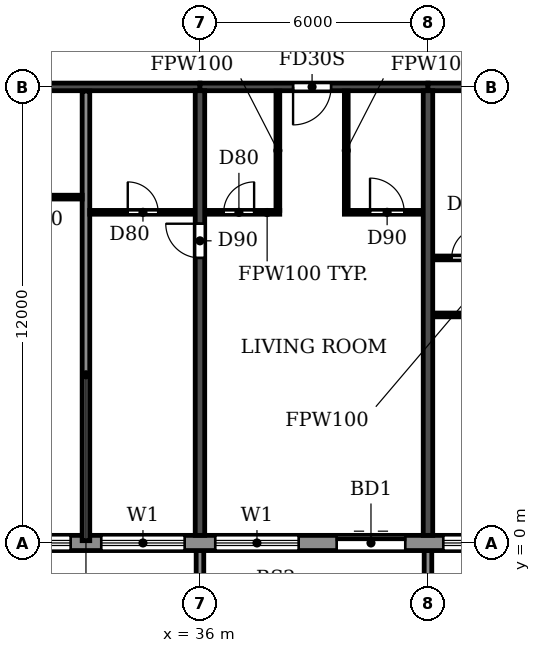
"""IFC4 building model, lengths in metres.
Left out: names, types, materials, properties, quantities, classifications, styles, units other than length and angle.
Written with IfcOpenShell. Run it as: python <this file> out.ifc"""

import sys

from ifc_helpers import new_model, si_unit, direction, frame, frame_2d, origin, place, context, subcontext, project, spatial, polyline, rectangle, outline, extrude, source, transform, mapped, element, fill, save


model = new_model("IFC4")
c1 = context("Model", 3, precision=1e-05, world=origin(), true_north=direction((0.0, 1.0)))
c2 = subcontext(c1, "Body", "Model", "MODEL_VIEW")
j1 = project(units=[si_unit("LENGTHUNIT", "METRE"), si_unit("PLANEANGLEUNIT", "RADIAN")], contexts=[c1])
p1 = place(None, origin())
s1 = spatial("IfcSite", under=j1, at=p1, CompositionType="ELEMENT")
p2 = place(p1, origin())
s2 = spatial("IfcBuilding", under=s1, at=p2, CompositionType="ELEMENT")
p3 = place(p2, frame((0.0, 0.0, 241.2)))
s3 = spatial("IfcBuildingStorey", under=s2, at=p3, CompositionType="ELEMENT", Elevation=241.2)
p4 = place(p3, frame((36.0, 0.2, 0.0), z_axis=(0.0, 0.0, 1.0), x_axis=(0.0, 1.0, 0.0)))
e1 = element("IfcWall", 1, at=p4, inside=s3, PredefinedType="SHEAR", context=c2, shape_type="SweptSolid", body=[
    extrude(rectangle(XDim=11.7, YDim=0.25, at=frame_2d((5.85, 0.0))), origin(), (0.0, 0.0, 1.0), 3.08),
])
p5 = place(p4, frame((7.3, 0.0, 0.0)))
e2 = element("IfcOpeningElement", 2, at=p5, cuts=e1, PredefinedType="OPENING", context=c2, shape_type="SweptSolid", body=[
    extrude(rectangle(XDim=0.9, YDim=2.1, at=frame_2d((0.45, 1.05))), frame((0.0, 0.135, 0.0), z_axis=(0.0, -1.0, 0.0), x_axis=(1.0, 0.0, 0.0)), (0.0, 0.0, 1.0), 0.27),
])
p6 = place(p3, frame((42.0, 0.2, 0.0), z_axis=(0.0, 0.0, 1.0), x_axis=(0.0, 1.0, 0.0)))
e3 = element("IfcWall", 3, at=p6, inside=s3, PredefinedType="SHEAR", context=c2, shape_type="SweptSolid", body=[
    extrude(rectangle(XDim=11.7, YDim=0.25, at=frame_2d((5.85, 0.0))), origin(), (0.0, 0.0, 1.0), 3.08),
])
p7 = place(p3, frame((30.0, 12.0, 0.0), z_axis=(0.0, 0.0, 1.0), x_axis=(1.0, 0.0, 0.0)))
e4 = element("IfcWall", 4, at=p7, inside=s3, PredefinedType="SHEAR", context=c2, shape_type="SweptSolid", body=[
    extrude(rectangle(XDim=6.0, YDim=0.2, at=frame_2d((3.0, 0.0))), origin(), (0.0, 0.0, 1.0), 2.48),
])
p8 = place(p3, frame((36.0, 12.0, 0.0), z_axis=(0.0, 0.0, 1.0), x_axis=(1.0, 0.0, 0.0)))
e5 = element("IfcWall", 5, at=p8, inside=s3, PredefinedType="SHEAR", context=c2, shape_type="SweptSolid", body=[
    extrude(rectangle(XDim=6.0, YDim=0.2, at=frame_2d((3.0, 0.0))), origin(), (0.0, 0.0, 1.0), 2.48),
])
p9 = place(p8, frame((2.45, 0.0, 0.0)))
e6 = element("IfcOpeningElement", 6, at=p9, cuts=e5, PredefinedType="OPENING", context=c2, shape_type="SweptSolid", body=[
    extrude(rectangle(XDim=1.0, YDim=2.1, at=frame_2d((0.5, 1.05))), frame((0.0, 0.11, 0.0), z_axis=(0.0, -1.0, 0.0), x_axis=(1.0, 0.0, 0.0)), (0.0, 0.0, 1.0), 0.22),
])
p10 = place(p3, frame((42.0, 12.0, 0.0), z_axis=(0.0, 0.0, 1.0), x_axis=(1.0, 0.0, 0.0)))
e7 = element("IfcWall", 7, at=p10, inside=s3, PredefinedType="SHEAR", context=c2, shape_type="SweptSolid", body=[
    extrude(rectangle(XDim=6.0, YDim=0.2, at=frame_2d((3.0, 0.0))), origin(), (0.0, 0.0, 1.0), 2.48),
])
p11 = place(p10, frame((2.45, 0.0, 0.0)))
e8 = element("IfcOpeningElement", 8, at=p11, cuts=e7, PredefinedType="OPENING", context=c2, shape_type="SweptSolid", body=[
    extrude(rectangle(XDim=1.0, YDim=2.1, at=frame_2d((0.5, 1.05))), frame((0.0, 0.11, 0.0), z_axis=(0.0, -1.0, 0.0), x_axis=(1.0, 0.0, 0.0)), (0.0, 0.0, 1.0), 0.22),
])
p12 = place(p3, frame((22.683, 0.0, 0.0), z_axis=(0.0, 0.0, 1.0), x_axis=(1.0, 0.0, 0.0)))
e9 = element("IfcWall", 9, at=p12, inside=s3, PredefinedType="STANDARD", context=c2, shape_type="SweptSolid", body=[
    extrude(rectangle(XDim=56.634, YDim=0.4, at=frame_2d((28.317, 0.0))), origin(), (0.0, 0.0, 1.0), 3.08),
])
p13 = place(p12, frame((1.717, 0.0, 0.9)))
e10 = element("IfcOpeningElement", 10, at=p13, cuts=e9, PredefinedType="OPENING", context=c2, shape_type="SweptSolid", body=[
    extrude(rectangle(XDim=2.2, YDim=1.5, at=frame_2d((1.1, 0.75))), frame((0.0, 0.21, 0.0), z_axis=(0.0, -1.0, 0.0), x_axis=(1.0, 0.0, 0.0)), (0.0, 0.0, 1.0), 0.42),
])
p14 = place(p12, frame((4.917, 0.0, 0.0)))
e11 = element("IfcOpeningElement", 11, at=p14, cuts=e9, PredefinedType="OPENING", context=c2, shape_type="SweptSolid", body=[
    extrude(rectangle(XDim=1.8, YDim=2.4, at=frame_2d((0.9, 1.2))), frame((0.0, 0.21, 0.0), z_axis=(0.0, -1.0, 0.0), x_axis=(1.0, 0.0, 0.0)), (0.0, 0.0, 1.0), 0.42),
])
p15 = place(p12, frame((7.717, 0.0, 0.9)))
e12 = element("IfcOpeningElement", 12, at=p15, cuts=e9, PredefinedType="OPENING", context=c2, shape_type="SweptSolid", body=[
    extrude(rectangle(XDim=2.2, YDim=1.5, at=frame_2d((1.1, 0.75))), frame((0.0, 0.21, 0.0), z_axis=(0.0, -1.0, 0.0), x_axis=(1.0, 0.0, 0.0)), (0.0, 0.0, 1.0), 0.42),
])
p16 = place(p12, frame((10.717, 0.0, 0.9)))
e13 = element("IfcOpeningElement", 13, at=p16, cuts=e9, PredefinedType="OPENING", context=c2, shape_type="SweptSolid", body=[
    extrude(rectangle(XDim=2.2, YDim=1.5, at=frame_2d((1.1, 0.75))), frame((0.0, 0.21, 0.0), z_axis=(0.0, -1.0, 0.0), x_axis=(1.0, 0.0, 0.0)), (0.0, 0.0, 1.0), 0.42),
])
p17 = place(p12, frame((13.717, 0.0, 0.9)))
e14 = element("IfcOpeningElement", 14, at=p17, cuts=e9, PredefinedType="OPENING", context=c2, shape_type="SweptSolid", body=[
    extrude(rectangle(XDim=2.2, YDim=1.5, at=frame_2d((1.1, 0.75))), frame((0.0, 0.21, 0.0), z_axis=(0.0, -1.0, 0.0), x_axis=(1.0, 0.0, 0.0)), (0.0, 0.0, 1.0), 0.42),
])
p18 = place(p12, frame((16.917, 0.0, 0.0)))
e15 = element("IfcOpeningElement", 15, at=p18, cuts=e9, PredefinedType="OPENING", context=c2, shape_type="SweptSolid", body=[
    extrude(rectangle(XDim=1.8, YDim=2.4, at=frame_2d((0.9, 1.2))), frame((0.0, 0.21, 0.0), z_axis=(0.0, -1.0, 0.0), x_axis=(1.0, 0.0, 0.0)), (0.0, 0.0, 1.0), 0.42),
])
p19 = place(p12, frame((19.717, 0.0, 0.9)))
e16 = element("IfcOpeningElement", 16, at=p19, cuts=e9, PredefinedType="OPENING", context=c2, shape_type="SweptSolid", body=[
    extrude(rectangle(XDim=2.2, YDim=1.5, at=frame_2d((1.1, 0.75))), frame((0.0, 0.21, 0.0), z_axis=(0.0, -1.0, 0.0), x_axis=(1.0, 0.0, 0.0)), (0.0, 0.0, 1.0), 0.42),
])
p20 = place(p12, frame((22.717, 0.0, 0.9)))
e17 = element("IfcOpeningElement", 17, at=p20, cuts=e9, PredefinedType="OPENING", context=c2, shape_type="SweptSolid", body=[
    extrude(rectangle(XDim=2.2, YDim=1.5, at=frame_2d((1.1, 0.75))), frame((0.0, 0.21, 0.0), z_axis=(0.0, -1.0, 0.0), x_axis=(1.0, 0.0, 0.0)), (0.0, 0.0, 1.0), 0.42),
])
p21 = place(p12, frame((25.717, 0.0, 0.9)))
e18 = element("IfcOpeningElement", 18, at=p21, cuts=e9, PredefinedType="OPENING", context=c2, shape_type="SweptSolid", body=[
    extrude(rectangle(XDim=2.2, YDim=1.5, at=frame_2d((1.1, 0.75))), frame((0.0, 0.21, 0.0), z_axis=(0.0, -1.0, 0.0), x_axis=(1.0, 0.0, 0.0)), (0.0, 0.0, 1.0), 0.42),
])
p22 = place(p12, frame((28.717, 0.0, 0.9)))
e19 = element("IfcOpeningElement", 19, at=p22, cuts=e9, PredefinedType="OPENING", context=c2, shape_type="SweptSolid", body=[
    extrude(rectangle(XDim=2.2, YDim=1.5, at=frame_2d((1.1, 0.75))), frame((0.0, 0.21, 0.0), z_axis=(0.0, -1.0, 0.0), x_axis=(1.0, 0.0, 0.0)), (0.0, 0.0, 1.0), 0.42),
])
p23 = place(p12, frame((31.717, 0.0, 0.9)))
e20 = element("IfcOpeningElement", 20, at=p23, cuts=e9, PredefinedType="OPENING", context=c2, shape_type="SweptSolid", body=[
    extrude(rectangle(XDim=2.2, YDim=1.5, at=frame_2d((1.1, 0.75))), frame((0.0, 0.21, 0.0), z_axis=(0.0, -1.0, 0.0), x_axis=(1.0, 0.0, 0.0)), (0.0, 0.0, 1.0), 0.42),
])
p24 = place(p12, frame((34.717, 0.0, 0.9)))
e21 = element("IfcOpeningElement", 21, at=p24, cuts=e9, PredefinedType="OPENING", context=c2, shape_type="SweptSolid", body=[
    extrude(rectangle(XDim=2.2, YDim=1.5, at=frame_2d((1.1, 0.75))), frame((0.0, 0.21, 0.0), z_axis=(0.0, -1.0, 0.0), x_axis=(1.0, 0.0, 0.0)), (0.0, 0.0, 1.0), 0.42),
])
p25 = place(p12, frame((37.917, 0.0, 0.0)))
e22 = element("IfcOpeningElement", 22, at=p25, cuts=e9, PredefinedType="OPENING", context=c2, shape_type="SweptSolid", body=[
    extrude(rectangle(XDim=1.8, YDim=2.4, at=frame_2d((0.9, 1.2))), frame((0.0, 0.21, 0.0), z_axis=(0.0, -1.0, 0.0), x_axis=(1.0, 0.0, 0.0)), (0.0, 0.0, 1.0), 0.42),
])
p26 = place(p12, frame((40.717, 0.0, 0.9)))
e23 = element("IfcOpeningElement", 23, at=p26, cuts=e9, PredefinedType="OPENING", context=c2, shape_type="SweptSolid", body=[
    extrude(rectangle(XDim=2.2, YDim=1.5, at=frame_2d((1.1, 0.75))), frame((0.0, 0.21, 0.0), z_axis=(0.0, -1.0, 0.0), x_axis=(1.0, 0.0, 0.0)), (0.0, 0.0, 1.0), 0.42),
])
p27 = place(p12, frame((43.717, 0.0, 0.9)))
e24 = element("IfcOpeningElement", 24, at=p27, cuts=e9, PredefinedType="OPENING", context=c2, shape_type="SweptSolid", body=[
    extrude(rectangle(XDim=2.2, YDim=1.5, at=frame_2d((1.1, 0.75))), frame((0.0, 0.21, 0.0), z_axis=(0.0, -1.0, 0.0), x_axis=(1.0, 0.0, 0.0)), (0.0, 0.0, 1.0), 0.42),
])
p28 = place(p12, frame((46.717, 0.0, 0.9)))
e25 = element("IfcOpeningElement", 25, at=p28, cuts=e9, PredefinedType="OPENING", context=c2, shape_type="SweptSolid", body=[
    extrude(rectangle(XDim=2.2, YDim=1.5, at=frame_2d((1.1, 0.75))), frame((0.0, 0.21, 0.0), z_axis=(0.0, -1.0, 0.0), x_axis=(1.0, 0.0, 0.0)), (0.0, 0.0, 1.0), 0.42),
])
p29 = place(p12, frame((49.717, 0.0, 0.9)))
e26 = element("IfcOpeningElement", 26, at=p29, cuts=e9, PredefinedType="OPENING", context=c2, shape_type="SweptSolid", body=[
    extrude(rectangle(XDim=2.2, YDim=1.5, at=frame_2d((1.1, 0.75))), frame((0.0, 0.21, 0.0), z_axis=(0.0, -1.0, 0.0), x_axis=(1.0, 0.0, 0.0)), (0.0, 0.0, 1.0), 0.42),
])
p30 = place(p12, frame((52.917, 0.0, 0.0)))
e27 = element("IfcOpeningElement", 27, at=p30, cuts=e9, PredefinedType="OPENING", context=c2, shape_type="SweptSolid", body=[
    extrude(rectangle(XDim=1.8, YDim=2.4, at=frame_2d((0.9, 1.2))), frame((0.0, 0.21, 0.0), z_axis=(0.0, -1.0, 0.0), x_axis=(1.0, 0.0, 0.0)), (0.0, 0.0, 1.0), 0.42),
])
m1 = source(origin(), c2, "Body", "SweptSolid", [
    extrude(outline(polyline([(0.0, 0.0), (0.2, 0.0), (0.2, 1.65), (0.0, 1.65), (0.0, 0.0)])), origin(), (0.0, 0.0, 1.0), 3.1),
])
for number, where in (
    (28, (35.9, -1.85, 0.0)),
    (29, (41.9, -1.85, 0.0)),
):
    element("IfcWall", number, at=place(p3, frame(where)), inside=s3, PredefinedType="STANDARD", context=c2, shape_type="MappedRepresentation", body=[
        mapped(m1, transform((0.0, 0.0, 0.0))),
    ])
p31 = place(p3, frame((33.0, 0.06, 0.0), z_axis=(0.0, 0.0, 1.0), x_axis=(0.0, 1.0, 0.0)))
e30 = element("IfcWall", 30, at=p31, inside=s3, PredefinedType="PARTITIONING", context=c2, shape_type="SweptSolid", body=[
    extrude(rectangle(XDim=11.83, YDim=0.2, at=frame_2d((5.915, 0.0))), origin(), (0.0, 0.0, 1.0), 3.08),
])
p32 = place(p3, frame((42.135, 6.0, 0.0), z_axis=(0.0, 0.0, 1.0), x_axis=(1.0, 0.0, 0.0)))
e31 = element("IfcWall", 31, at=p32, inside=s3, PredefinedType="PARTITIONING", context=c2, shape_type="SweptSolid", body=[
    extrude(rectangle(XDim=2.915, YDim=0.1, at=frame_2d((1.458, 0.0))), origin(), (0.0, 0.0, 1.0), 3.08),
])
p33 = place(p32, frame((1.465, 0.0, 0.0)))
e32 = element("IfcOpeningElement", 32, at=p33, cuts=e31, PredefinedType="OPENING", context=c2, shape_type="SweptSolid", body=[
    extrude(rectangle(XDim=0.9, YDim=2.1, at=frame_2d((0.45, 1.05))), frame((0.0, 0.06, 0.0), z_axis=(0.0, -1.0, 0.0), x_axis=(1.0, 0.0, 0.0)), (0.0, 0.0, 1.0), 0.12),
])
p34 = place(p3, frame((42.135, 7.5, 0.0), z_axis=(0.0, 0.0, 1.0), x_axis=(1.0, 0.0, 0.0)))
e33 = element("IfcWall", 33, at=p34, inside=s3, PredefinedType="PARTITIONING", context=c2, shape_type="SweptSolid", body=[
    extrude(rectangle(XDim=1.965, YDim=0.1, at=frame_2d((0.982, 0.0))), origin(), (0.0, 0.0, 1.0), 3.08),
])
p35 = place(p34, frame((0.49, 0.0, 0.0)))
e34 = element("IfcOpeningElement", 34, at=p35, cuts=e33, PredefinedType="OPENING", context=c2, shape_type="SweptSolid", body=[
    extrude(rectangle(XDim=0.8, YDim=2.1, at=frame_2d((0.4, 1.05))), frame((0.0, 0.06, 0.0), z_axis=(0.0, -1.0, 0.0), x_axis=(1.0, 0.0, 0.0)), (0.0, 0.0, 1.0), 0.12),
])
p36 = place(p3, frame((33.1, 8.7, 0.0), z_axis=(0.0, 0.0, 1.0), x_axis=(1.0, 0.0, 0.0)))
e35 = element("IfcWall", 35, at=p36, inside=s3, PredefinedType="PARTITIONING", context=c2, shape_type="SweptSolid", body=[
    extrude(rectangle(XDim=2.765, YDim=0.1, at=frame_2d((1.382, 0.0))), origin(), (0.0, 0.0, 1.0), 3.08),
])
p37 = place(p36, frame((1.0, 0.0, 0.0)))
e36 = element("IfcOpeningElement", 36, at=p37, cuts=e35, PredefinedType="OPENING", context=c2, shape_type="SweptSolid", body=[
    extrude(rectangle(XDim=0.8, YDim=2.1, at=frame_2d((0.4, 1.05))), frame((0.0, 0.06, 0.0), z_axis=(0.0, -1.0, 0.0), x_axis=(1.0, 0.0, 0.0)), (0.0, 0.0, 1.0), 0.12),
])
p38 = place(p3, frame((36.135, 8.7, 0.0), z_axis=(0.0, 0.0, 1.0), x_axis=(1.0, 0.0, 0.0)))
e37 = element("IfcWall", 37, at=p38, inside=s3, PredefinedType="PARTITIONING", context=c2, shape_type="SweptSolid", body=[
    extrude(rectangle(XDim=1.965, YDim=0.1, at=frame_2d((0.982, 0.0))), origin(), (0.0, 0.0, 1.0), 3.08),
])
p39 = place(p38, frame((0.49, 0.0, 0.0)))
e38 = element("IfcOpeningElement", 38, at=p39, cuts=e37, PredefinedType="OPENING", context=c2, shape_type="SweptSolid", body=[
    extrude(rectangle(XDim=0.8, YDim=2.1, at=frame_2d((0.4, 1.05))), frame((0.0, 0.06, 0.0), z_axis=(0.0, -1.0, 0.0), x_axis=(1.0, 0.0, 0.0)), (0.0, 0.0, 1.0), 0.12),
])
p40 = place(p3, frame((39.8, 8.7, 0.0), z_axis=(0.0, 0.0, 1.0), x_axis=(1.0, 0.0, 0.0)))
e39 = element("IfcWall", 39, at=p40, inside=s3, PredefinedType="PARTITIONING", context=c2, shape_type="SweptSolid", body=[
    extrude(rectangle(XDim=2.065, YDim=0.1, at=frame_2d((1.032, 0.0))), origin(), (0.0, 0.0, 1.0), 3.08),
])
p41 = place(p40, frame((0.675, 0.0, 0.0)))
e40 = element("IfcOpeningElement", 40, at=p41, cuts=e39, PredefinedType="OPENING", context=c2, shape_type="SweptSolid", body=[
    extrude(rectangle(XDim=0.9, YDim=2.1, at=frame_2d((0.45, 1.05))), frame((0.0, 0.06, 0.0), z_axis=(0.0, -1.0, 0.0), x_axis=(1.0, 0.0, 0.0)), (0.0, 0.0, 1.0), 0.12),
])
p42 = place(p3, frame((30.135, 9.1, 0.0), z_axis=(0.0, 0.0, 1.0), x_axis=(1.0, 0.0, 0.0)))
e41 = element("IfcWall", 41, at=p42, inside=s3, PredefinedType="PARTITIONING", context=c2, shape_type="SweptSolid", body=[
    extrude(rectangle(XDim=2.765, YDim=0.1, at=frame_2d((1.382, 0.0))), origin(), (0.0, 0.0, 1.0), 3.08),
])
p43 = place(p42, frame((0.965, 0.0, 0.0)))
e42 = element("IfcOpeningElement", 42, at=p43, cuts=e41, PredefinedType="OPENING", context=c2, shape_type="SweptSolid", body=[
    extrude(rectangle(XDim=0.8, YDim=2.1, at=frame_2d((0.4, 1.05))), frame((0.0, 0.06, 0.0), z_axis=(0.0, -1.0, 0.0), x_axis=(1.0, 0.0, 0.0)), (0.0, 0.0, 1.0), 0.12),
])
for number, where, z_axis, x_axis in (
    (43, (38.05, 8.75, 0.0), (0.0, 0.0, 1.0), (0.0, 1.0, 0.0)),
    (44, (39.85, 8.75, 0.0), (0.0, 0.0, 1.0), (0.0, 1.0, 0.0)),
):
    element("IfcWall", number, at=place(p3, frame(where, z_axis=z_axis, x_axis=x_axis)), inside=s3, PredefinedType="PARTITIONING", context=c2, shape_type="SweptSolid", body=[
        extrude(rectangle(XDim=3.14, YDim=0.1, at=frame_2d((1.57, 0.0))), origin(), (0.0, 0.0, 1.0), 3.08),
    ])
p44 = place(p15, origin())
e45 = element("IfcWindow", 45, at=p44, inside=s3, PartitioningType="DOUBLE_PANEL_HORIZONTAL", PredefinedType="WINDOW", context=c2, shape_type="SweptSolid", body=[
    extrude(rectangle(XDim=2.2, YDim=1.5, at=frame_2d((1.1, 0.75))), frame((0.0, 0.03, 0.0), z_axis=(0.0, -1.0, 0.0), x_axis=(1.0, 0.0, 0.0)), (0.0, 0.0, 1.0), 0.06),
])
fill(e12, e45)
p45 = place(p16, origin())
e46 = element("IfcWindow", 46, at=p45, inside=s3, PartitioningType="DOUBLE_PANEL_HORIZONTAL", PredefinedType="WINDOW", context=c2, shape_type="SweptSolid", body=[
    extrude(rectangle(XDim=2.2, YDim=1.5, at=frame_2d((1.1, 0.75))), frame((0.0, 0.03, 0.0), z_axis=(0.0, -1.0, 0.0), x_axis=(1.0, 0.0, 0.0)), (0.0, 0.0, 1.0), 0.06),
])
fill(e13, e46)
p46 = place(p17, origin())
e47 = element("IfcWindow", 47, at=p46, inside=s3, PartitioningType="DOUBLE_PANEL_HORIZONTAL", PredefinedType="WINDOW", context=c2, shape_type="SweptSolid", body=[
    extrude(rectangle(XDim=2.2, YDim=1.5, at=frame_2d((1.1, 0.75))), frame((0.0, 0.03, 0.0), z_axis=(0.0, -1.0, 0.0), x_axis=(1.0, 0.0, 0.0)), (0.0, 0.0, 1.0), 0.06),
])
fill(e14, e47)
p47 = place(p18, origin())
e48 = element("IfcDoor", 48, at=p47, inside=s3, OperationType="DOUBLE_DOOR_SLIDING", PredefinedType="DOOR", context=c2, shape_type="SweptSolid", body=[
    extrude(rectangle(XDim=1.8, YDim=2.4, at=frame_2d((0.9, 1.2))), frame((0.0, 0.025, 0.0), z_axis=(0.0, -1.0, 0.0), x_axis=(1.0, 0.0, 0.0)), (0.0, 0.0, 1.0), 0.05),
])
fill(e15, e48)
p48 = place(p19, origin())
e49 = element("IfcWindow", 49, at=p48, inside=s3, PartitioningType="DOUBLE_PANEL_HORIZONTAL", PredefinedType="WINDOW", context=c2, shape_type="SweptSolid", body=[
    extrude(rectangle(XDim=2.2, YDim=1.5, at=frame_2d((1.1, 0.75))), frame((0.0, 0.03, 0.0), z_axis=(0.0, -1.0, 0.0), x_axis=(1.0, 0.0, 0.0)), (0.0, 0.0, 1.0), 0.06),
])
fill(e16, e49)
p49 = place(p37, origin())
e50 = element("IfcDoor", 50, at=p49, inside=s3, OperationType="SINGLE_SWING_LEFT", PredefinedType="DOOR", context=c2, shape_type="SweptSolid", body=[
    extrude(rectangle(XDim=0.8, YDim=2.1, at=frame_2d((0.4, 1.05))), frame((0.0, 0.025, 0.0), z_axis=(0.0, -1.0, 0.0), x_axis=(1.0, 0.0, 0.0)), (0.0, 0.0, 1.0), 0.05),
])
fill(e36, e50)
p50 = place(p5, origin())
e51 = element("IfcDoor", 51, at=p50, inside=s3, OperationType="SINGLE_SWING_RIGHT", PredefinedType="DOOR", context=c2, shape_type="SweptSolid", body=[
    extrude(rectangle(XDim=0.9, YDim=2.1, at=frame_2d((0.45, 1.05))), frame((0.0, 0.025, 0.0), z_axis=(0.0, -1.0, 0.0), x_axis=(1.0, 0.0, 0.0)), (0.0, 0.0, 1.0), 0.05),
])
fill(e2, e51)
p51 = place(p39, origin())
e52 = element("IfcDoor", 52, at=p51, inside=s3, OperationType="SINGLE_SWING_RIGHT", PredefinedType="DOOR", context=c2, shape_type="SweptSolid", body=[
    extrude(rectangle(XDim=0.8, YDim=2.1, at=frame_2d((0.4, 1.05))), frame((0.0, 0.025, 0.0), z_axis=(0.0, -1.0, 0.0), x_axis=(1.0, 0.0, 0.0)), (0.0, 0.0, 1.0), 0.05),
])
fill(e38, e52)
p52 = place(p9, frame((1.0, 0.0, 0.0), z_axis=(0.0, 0.0, 1.0), x_axis=(-1.0, 0.0, 0.0)))
e53 = element("IfcDoor", 53, at=p52, inside=s3, OperationType="SINGLE_SWING_RIGHT", PredefinedType="DOOR", context=c2, shape_type="SweptSolid", body=[
    extrude(rectangle(XDim=1.0, YDim=2.1, at=frame_2d((0.5, 1.05))), frame((0.0, 0.025, 0.0), z_axis=(0.0, -1.0, 0.0), x_axis=(1.0, 0.0, 0.0)), (0.0, 0.0, 1.0), 0.05),
])
fill(e6, e53)
p53 = place(p41, origin())
e54 = element("IfcDoor", 54, at=p53, inside=s3, OperationType="SINGLE_SWING_LEFT", PredefinedType="DOOR", context=c2, shape_type="SweptSolid", body=[
    extrude(rectangle(XDim=0.9, YDim=2.1, at=frame_2d((0.45, 1.05))), frame((0.0, 0.025, 0.0), z_axis=(0.0, -1.0, 0.0), x_axis=(1.0, 0.0, 0.0)), (0.0, 0.0, 1.0), 0.05),
])
fill(e40, e54)
p54 = place(p35, origin())
e55 = element("IfcDoor", 55, at=p54, inside=s3, OperationType="SINGLE_SWING_RIGHT", PredefinedType="DOOR", context=c2, shape_type="SweptSolid", body=[
    extrude(rectangle(XDim=0.8, YDim=2.1, at=frame_2d((0.4, 1.05))), frame((0.0, 0.025, 0.0), z_axis=(0.0, -1.0, 0.0), x_axis=(1.0, 0.0, 0.0)), (0.0, 0.0, 1.0), 0.05),
])
fill(e34, e55)
save(model, sys.argv[1])
